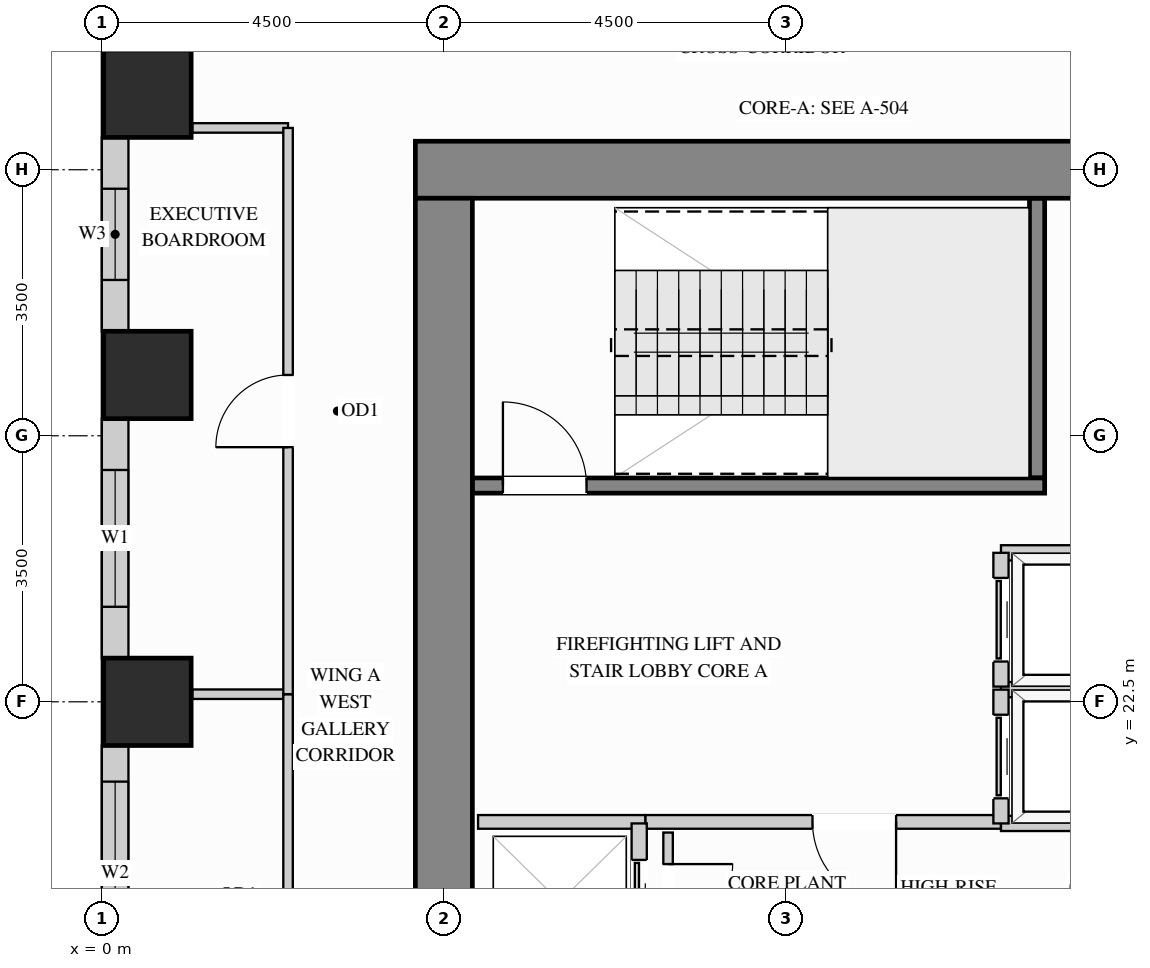
"""IFC4 building model, lengths in metres.
Left out: names, types, materials, properties, quantities, classifications, styles, units other than length and angle.
Written with IfcOpenShell. Run it as: python <this file> out.ifc"""

import sys

from ifc_helpers import new_model, si_unit, direction, frame, frame_2d, origin, origin_2d, place, context, subcontext, project, spatial, rectangle, extrude, source, transform, mapped, element, fill, save


model = new_model("IFC4")
c1 = context("Model", 3, precision=1e-05, world=origin(), true_north=direction((0.0, 1.0)))
c2 = subcontext(c1, "Body", "Model", "MODEL_VIEW")
j1 = project(units=[si_unit("LENGTHUNIT", "METRE"), si_unit("PLANEANGLEUNIT", "RADIAN")], contexts=[c1])
p1 = place(None, origin())
s1 = spatial("IfcSite", under=j1, at=p1, CompositionType="ELEMENT")
p2 = place(p1, origin())
s2 = spatial("IfcBuilding", under=s1, at=p2, CompositionType="ELEMENT")
p3 = place(p2, frame((0.0, 0.0, 131.4)))
s3 = spatial("IfcBuildingStorey", under=s2, at=p3, CompositionType="ELEMENT", Elevation=131.4)
m1 = source(origin(), c2, "Body", "SweptSolid", [
    extrude(rectangle(XDim=1.15, YDim=1.15, at=origin_2d()), origin(), (0.0, 0.0, 1.0), 3.38),
])
for number, where, z_axis, x_axis in (
    (1, (0.6, 22.5, 0.0), (0.0, 0.0, 1.0), (1.0, 0.0, 0.0)),
    (2, (0.6, 26.8, 0.0), (0.0, 0.0, 1.0), (1.0, 0.0, 0.0)),
    (3, (0.6, 30.5, 0.0), (0.0, 0.0, 1.0), (1.0, 0.0, 0.0)),
):
    element("IfcColumn", number, at=place(p3, frame(where, z_axis=z_axis, x_axis=x_axis)), inside=s3, PredefinedType="COLUMN", context=c2, shape_type="MappedRepresentation", body=[
        mapped(m1, transform((0.0, 0.0, 0.0), x_axis=(1.0, 0.0, 0.0), y_axis=(0.0, 1.0, 0.0), z_axis=(0.0, 0.0, 1.0))),
    ])
m2 = source(origin(), c2, "Body", "SweptSolid", [
    extrude(rectangle(XDim=10.75, YDim=0.75, at=frame_2d((5.375, 0.0))), origin(), (0.0, 0.0, 1.0), 3.38),
])
p4 = place(p3, frame((4.125, 29.5, 0.0), z_axis=(0.0, 0.0, 1.0), x_axis=(1.0, 0.0, 0.0)))
e4 = element("IfcWall", 4, at=p4, inside=s3, PredefinedType="SHEAR", context=c2, shape_type="MappedRepresentation", body=[
    mapped(m2, transform((0.0, 0.0, 0.0), x_axis=(1.0, 0.0, 0.0), y_axis=(0.0, 1.0, 0.0), z_axis=(0.0, 0.0, 1.0))),
])
m3 = source(origin(), c2, "Body", "SweptSolid", [
    extrude(rectangle(XDim=20.25, YDim=0.75, at=frame_2d((10.125, 0.0))), origin(), (0.0, 0.0, 1.0), 3.38),
])
p5 = place(p3, frame((4.5, 8.875, 0.0), z_axis=(0.0, 0.0, 1.0), x_axis=(0.0, 1.0, 0.0)))
e5 = element("IfcWall", 5, at=p5, inside=s3, PredefinedType="SHEAR", context=c2, shape_type="MappedRepresentation", body=[
    mapped(m3, transform((0.0, 0.0, 0.0), x_axis=(1.0, 0.0, 0.0), y_axis=(0.0, 1.0, 0.0), z_axis=(0.0, 0.0, 1.0))),
])
p6 = place(p3, frame((0.175, 29.927, 0.0), z_axis=(0.0, 0.0, 1.0), x_axis=(0.0, -1.0, 0.0)))
e6 = element("IfcWall", 6, at=p6, inside=s3, PredefinedType="SOLIDWALL", context=c2, shape_type="SweptSolid", body=[
    extrude(rectangle(XDim=2.554, YDim=0.35, at=frame_2d((1.277, 0.0))), origin(), (0.0, 0.0, 1.0), 3.365),
])
p7 = place(p6, frame((0.677, 0.0, 0.78)))
e7 = element("IfcOpeningElement", 7, at=p7, cuts=e6, PredefinedType="OPENING", context=c2, shape_type="SweptSolid", body=[
    extrude(rectangle(XDim=1.2, YDim=2.1, at=frame_2d((0.6, 1.05))), frame((0.0, 0.185, 0.0), z_axis=(0.0, -1.0, 0.0), x_axis=(1.0, 0.0, 0.0)), (0.0, 0.0, 1.0), 0.37),
])
p8 = place(p3, frame((0.175, 26.227, 0.0), z_axis=(0.0, 0.0, 1.0), x_axis=(0.0, -1.0, 0.0)))
e8 = element("IfcWall", 8, at=p8, inside=s3, PredefinedType="SOLIDWALL", context=c2, shape_type="SweptSolid", body=[
    extrude(rectangle(XDim=3.154, YDim=0.35, at=frame_2d((1.577, 0.0))), origin(), (0.0, 0.0, 1.0), 3.365),
])
p9 = place(p8, frame((0.677, 0.0, 0.78)))
e9 = element("IfcOpeningElement", 9, at=p9, cuts=e8, PredefinedType="OPENING", context=c2, shape_type="SweptSolid", body=[
    extrude(rectangle(XDim=1.8, YDim=2.1, at=frame_2d((0.9, 1.05))), frame((0.0, 0.185, 0.0), z_axis=(0.0, -1.0, 0.0), x_axis=(1.0, 0.0, 0.0)), (0.0, 0.0, 1.0), 0.37),
])
p10 = place(p3, frame((0.175, 21.927, 0.0), z_axis=(0.0, 0.0, 1.0), x_axis=(0.0, -1.0, 0.0)))
e10 = element("IfcWall", 10, at=p10, inside=s3, PredefinedType="SOLIDWALL", context=c2, shape_type="SweptSolid", body=[
    extrude(rectangle(XDim=3.354, YDim=0.35, at=frame_2d((1.677, 0.0))), origin(), (0.0, 0.0, 1.0), 3.365),
])
p11 = place(p10, frame((0.477, 0.0, 0.78)))
e11 = element("IfcOpeningElement", 11, at=p11, cuts=e10, PredefinedType="OPENING", context=c2, shape_type="SweptSolid", body=[
    extrude(rectangle(XDim=2.4, YDim=2.1, at=frame_2d((1.2, 1.05))), frame((0.0, 0.185, 0.0), z_axis=(0.0, -1.0, 0.0), x_axis=(1.0, 0.0, 0.0)), (0.0, 0.0, 1.0), 0.37),
])
p12 = place(p3, frame((7.15, 20.92, 0.0), z_axis=(0.0, 0.0, 1.0), x_axis=(1.0, 0.0, 0.0)))
e12 = element("IfcWall", 12, at=p12, inside=s3, PredefinedType="PARTITIONING", context=c2, shape_type="SweptSolid", body=[
    extrude(rectangle(XDim=4.68, YDim=0.18, at=frame_2d((2.34, 0.0))), origin(), (0.0, 0.0, 1.0), 3.365),
])
p13 = place(p12, frame((2.2, 0.0, 0.0)))
e13 = element("IfcOpeningElement", 13, at=p13, cuts=e12, PredefinedType="OPENING", context=c2, shape_type="SweptSolid", body=[
    extrude(rectangle(XDim=1.1, YDim=2.15, at=frame_2d((0.55, 1.075))), frame((0.0, 0.1, 0.0), z_axis=(0.0, -1.0, 0.0), x_axis=(1.0, 0.0, 0.0)), (0.0, 0.0, 1.0), 0.2),
])
m4 = source(origin(), c2, "Body", "SweptSolid", [
    extrude(rectangle(XDim=2.2, YDim=0.18, at=frame_2d((1.1, 0.0))), origin(), (0.0, 0.0, 1.0), 3.365),
])
p14 = place(p3, frame((4.95, 20.92, 0.0), z_axis=(0.0, 0.0, 1.0), x_axis=(1.0, 0.0, 0.0)))
e14 = element("IfcWall", 14, at=p14, inside=s3, PredefinedType="PARTITIONING", context=c2, shape_type="MappedRepresentation", body=[
    mapped(m4, transform((0.0, 0.0, 0.0), x_axis=(1.0, 0.0, 0.0), y_axis=(0.0, 1.0, 0.0), z_axis=(0.0, 0.0, 1.0))),
])
p15 = place(p3, frame((7.45, 19.2, 0.0), z_axis=(0.0, 0.0, 1.0), x_axis=(0.0, 1.0, 0.0)))
e15 = element("IfcWall", 15, at=p15, inside=s3, PredefinedType="PARTITIONING", context=c2, shape_type="SweptSolid", body=[
    extrude(rectangle(XDim=1.58, YDim=0.125, at=frame_2d((0.79, 0.0))), origin(), (0.0, 0.0, 1.0), 3.365),
])
p16 = place(p15, frame((0.315, 0.0, 0.0)))
e16 = element("IfcOpeningElement", 16, at=p16, cuts=e15, PredefinedType="OPENING", context=c2, shape_type="SweptSolid", body=[
    extrude(rectangle(XDim=0.85, YDim=2.1, at=frame_2d((0.425, 1.05))), frame((0.0, 0.073, 0.0), z_axis=(0.0, -1.0, 0.0), x_axis=(1.0, 0.0, 0.0)), (0.0, 0.0, 1.0), 0.145),
])
m5 = source(origin(), c2, "Body", "SweptSolid", [
    extrude(rectangle(XDim=1.26, YDim=0.125, at=frame_2d((0.63, 0.0))), origin(), (0.0, 0.0, 1.0), 3.365),
])
for number, where, z_axis, x_axis in (
    (17, (1.19, 30.05, 0.0), (0.0, 0.0, 1.0), (1.0, 0.0, 0.0)),
    (18, (1.19, 22.6, 0.0), (0.0, 0.0, 1.0), (1.0, 0.0, 0.0)),
):
    element("IfcWall", number, at=place(p3, frame(where, z_axis=z_axis, x_axis=x_axis)), inside=s3, PredefinedType="PARTITIONING", context=c2, shape_type="MappedRepresentation", body=[
        mapped(m5, transform((0.0, 0.0, 0.0), x_axis=(1.0, 0.0, 0.0), y_axis=(0.0, 1.0, 0.0), z_axis=(0.0, 0.0, 1.0))),
    ])
p17 = place(p3, frame((2.45, 15.1, 0.0), z_axis=(0.0, 0.0, 1.0), x_axis=(0.0, 1.0, 0.0)))
e19 = element("IfcWall", 19, at=p17, inside=s3, PredefinedType="PARTITIONING", context=c2, shape_type="SweptSolid", body=[
    extrude(rectangle(XDim=7.5, YDim=0.125, at=frame_2d((3.75, 0.0))), origin(), (0.0, 0.0, 1.0), 3.365),
])
p18 = place(p17, frame((3.275, 0.0, 0.0)))
e20 = element("IfcOpeningElement", 20, at=p18, cuts=e19, PredefinedType="OPENING", context=c2, shape_type="SweptSolid", body=[
    extrude(rectangle(XDim=0.95, YDim=2.15, at=frame_2d((0.475, 1.075))), frame((0.0, 0.073, 0.0), z_axis=(0.0, -1.0, 0.0), x_axis=(1.0, 0.0, 0.0)), (0.0, 0.0, 1.0), 0.145),
])
p19 = place(p3, frame((2.45, 22.6, 0.0), z_axis=(0.0, 0.0, 1.0), x_axis=(0.0, 1.0, 0.0)))
e21 = element("IfcWall", 21, at=p19, inside=s3, PredefinedType="PARTITIONING", context=c2, shape_type="SweptSolid", body=[
    extrude(rectangle(XDim=7.45, YDim=0.125, at=frame_2d((3.725, 0.0))), origin(), (0.0, 0.0, 1.0), 3.365),
])
p20 = place(p19, frame((3.25, 0.0, 0.0)))
e22 = element("IfcOpeningElement", 22, at=p20, cuts=e21, PredefinedType="OPENING", context=c2, shape_type="SweptSolid", body=[
    extrude(rectangle(XDim=0.95, YDim=2.15, at=frame_2d((0.475, 1.075))), frame((0.0, 0.073, 0.0), z_axis=(0.0, -1.0, 0.0), x_axis=(1.0, 0.0, 0.0)), (0.0, 0.0, 1.0), 0.145),
])
m6 = source(origin(), c2, "Body", "SweptSolid", [
    extrude(rectangle(XDim=2.265, YDim=0.2, at=frame_2d((1.132, 0.0))), origin(), (0.0, 0.0, 1.0), 3.365),
])
for number, where, z_axis, x_axis in (
    (23, (11.83, 22.66, 0.0), (0.0, 0.0, 1.0), (1.0, 0.0, 0.0)),
    (24, (11.83, 20.9, 0.0), (0.0, 0.0, 1.0), (1.0, 0.0, 0.0)),
):
    element("IfcWall", number, at=place(p3, frame(where, z_axis=z_axis, x_axis=x_axis)), inside=s3, PredefinedType="PARTITIONING", context=c2, shape_type="MappedRepresentation", body=[
        mapped(m6, transform((0.0, 0.0, 0.0), x_axis=(1.0, 0.0, 0.0), y_axis=(0.0, 1.0, 0.0), z_axis=(0.0, 0.0, 1.0))),
    ])
p21 = place(p3, frame((11.83, 20.9, 0.0), z_axis=(0.0, 0.0, 1.0), x_axis=(0.0, 1.0, 0.0)))
e25 = element("IfcWall", 25, at=p21, inside=s3, PredefinedType="PARTITIONING", context=c2, shape_type="SweptSolid", body=[
    extrude(rectangle(XDim=1.76, YDim=0.2, at=frame_2d((0.88, 0.0))), origin(), (0.0, 0.0, 1.0), 3.365),
])
p22 = place(p21, frame((0.33, 0.0, 0.0)))
e26 = element("IfcOpeningElement", 26, at=p22, cuts=e25, PredefinedType="OPENING", context=c2, shape_type="SweptSolid", body=[
    extrude(rectangle(XDim=1.1, YDim=2.2, at=frame_2d((0.55, 1.1))), frame((0.0, 0.11, 0.0), z_axis=(0.0, -1.0, 0.0), x_axis=(1.0, 0.0, 0.0)), (0.0, 0.0, 1.0), 0.22),
])
p23 = place(p3, frame((11.83, 24.46, 0.0), z_axis=(0.0, 0.0, 1.0), x_axis=(1.0, 0.0, 0.0)))
e27 = element("IfcWall", 27, at=p23, inside=s3, PredefinedType="PARTITIONING", context=c2, shape_type="MappedRepresentation", body=[
    mapped(m6, transform((0.0, 0.0, 0.0), x_axis=(1.0, 0.0, 0.0), y_axis=(0.0, 1.0, 0.0), z_axis=(0.0, 0.0, 1.0))),
])
p24 = place(p3, frame((11.83, 22.7, 0.0), z_axis=(0.0, 0.0, 1.0), x_axis=(0.0, 1.0, 0.0)))
e28 = element("IfcWall", 28, at=p24, inside=s3, PredefinedType="PARTITIONING", context=c2, shape_type="SweptSolid", body=[
    extrude(rectangle(XDim=1.76, YDim=0.2, at=frame_2d((0.88, 0.0))), origin(), (0.0, 0.0, 1.0), 3.365),
])
p25 = place(p24, frame((0.33, 0.0, 0.0)))
e29 = element("IfcOpeningElement", 29, at=p25, cuts=e28, PredefinedType="OPENING", context=c2, shape_type="SweptSolid", body=[
    extrude(rectangle(XDim=1.1, YDim=2.2, at=frame_2d((0.55, 1.1))), frame((0.0, 0.11, 0.0), z_axis=(0.0, -1.0, 0.0), x_axis=(1.0, 0.0, 0.0)), (0.0, 0.0, 1.0), 0.22),
])
p26 = place(p3, frame((7.07, 18.84, 0.0), z_axis=(0.0, 0.0, 1.0), x_axis=(0.0, 1.0, 0.0)))
e30 = element("IfcWall", 30, at=p26, inside=s3, PredefinedType="PARTITIONING", context=c2, shape_type="SweptSolid", body=[
    extrude(rectangle(XDim=2.06, YDim=0.2, at=frame_2d((1.03, 0.0))), origin(), (0.0, 0.0, 1.0), 3.365),
])
p27 = place(p26, frame((0.48, 0.0, 0.0)))
e31 = element("IfcOpeningElement", 31, at=p27, cuts=e30, PredefinedType="OPENING", context=c2, shape_type="SweptSolid", body=[
    extrude(rectangle(XDim=1.1, YDim=2.2, at=frame_2d((0.55, 1.1))), frame((0.0, 0.11, 0.0), z_axis=(0.0, -1.0, 0.0), x_axis=(1.0, 0.0, 0.0)), (0.0, 0.0, 1.0), 0.22),
])
m7 = source(origin(), c2, "Body", "SweptSolid", [
    extrude(rectangle(XDim=3.678, YDim=0.2, at=frame_2d((1.839, 0.0))), origin(), (0.0, 0.0, 1.0), 3.38),
])
p28 = place(p3, frame((12.305, 25.445, 0.0), z_axis=(0.0, 0.0, 1.0), x_axis=(0.0, 1.0, 0.0)))
e32 = element("IfcWall", 32, at=p28, inside=s3, PredefinedType="SHEAR", context=c2, shape_type="MappedRepresentation", body=[
    mapped(m7, transform((0.0, 0.0, 0.0), x_axis=(1.0, 0.0, 0.0), y_axis=(0.0, 1.0, 0.0), z_axis=(0.0, 0.0, 1.0))),
])
p29 = place(p3, frame((4.877, 25.345, 0.0), z_axis=(0.0, 0.0, 1.0), x_axis=(1.0, 0.0, 0.0)))
e33 = element("IfcWall", 33, at=p29, inside=s3, PredefinedType="SHEAR", context=c2, shape_type="SweptSolid", body=[
    extrude(rectangle(XDim=7.528, YDim=0.2, at=frame_2d((3.764, 0.0))), origin(), (0.0, 0.0, 1.0), 3.38),
])
p30 = place(p29, frame((0.4, 0.0, 0.0)))
e34 = element("IfcOpeningElement", 34, at=p30, cuts=e33, PredefinedType="OPENING", context=c2, shape_type="SweptSolid", body=[
    extrude(rectangle(XDim=1.1, YDim=2.15, at=frame_2d((0.55, 1.075))), frame((0.0, 0.11, 0.0), z_axis=(0.0, -1.0, 0.0), x_axis=(1.0, 0.0, 0.0)), (0.0, 0.0, 1.0), 0.22),
])
m8 = source(origin(), c2, "Body", "SweptSolid", [
    extrude(rectangle(XDim=1.1, YDim=2.15, at=frame_2d((0.55, 1.075))), frame((0.0, 0.025, 0.0), z_axis=(0.0, -1.0, 0.0), x_axis=(1.0, 0.0, 0.0)), (0.0, 0.0, 1.0), 0.05),
])
p31 = place(p13, origin())
e35 = element("IfcDoor", 35, at=p31, inside=s3, OperationType="SINGLE_SWING_RIGHT", PredefinedType="DOOR", context=c2, shape_type="MappedRepresentation", body=[
    mapped(m8, transform((0.0, 0.0, 0.0), x_axis=(1.0, 0.0, 0.0), y_axis=(0.0, 1.0, 0.0), z_axis=(0.0, 0.0, 1.0))),
])
fill(e13, e35)
m9 = source(origin(), c2, "Body", "SweptSolid", [
    extrude(rectangle(XDim=1.1, YDim=2.2, at=frame_2d((0.55, 1.1))), frame((0.0, 0.025, 0.0), z_axis=(0.0, -1.0, 0.0), x_axis=(1.0, 0.0, 0.0)), (0.0, 0.0, 1.0), 0.05),
])
p32 = place(p22, origin())
e36 = element("IfcDoor", 36, at=p32, inside=s3, OperationType="SLIDING_TO_LEFT", PredefinedType="DOOR", context=c2, shape_type="MappedRepresentation", body=[
    mapped(m9, transform((0.0, 0.0, 0.0), x_axis=(1.0, 0.0, 0.0), y_axis=(0.0, 1.0, 0.0), z_axis=(0.0, 0.0, 1.0))),
])
fill(e26, e36)
p33 = place(p25, origin())
e37 = element("IfcDoor", 37, at=p33, inside=s3, OperationType="SLIDING_TO_LEFT", PredefinedType="DOOR", context=c2, shape_type="MappedRepresentation", body=[
    mapped(m9, transform((0.0, 0.0, 0.0), x_axis=(1.0, 0.0, 0.0), y_axis=(0.0, 1.0, 0.0), z_axis=(0.0, 0.0, 1.0))),
])
fill(e29, e37)
p34 = place(p27, origin())
e38 = element("IfcDoor", 38, at=p34, inside=s3, OperationType="SLIDING_TO_LEFT", PredefinedType="DOOR", context=c2, shape_type="MappedRepresentation", body=[
    mapped(m9, transform((0.0, 0.0, 0.0), x_axis=(1.0, 0.0, 0.0), y_axis=(0.0, 1.0, 0.0), z_axis=(0.0, 0.0, 1.0))),
])
fill(e31, e38)
m10 = source(origin(), c2, "Body", "SweptSolid", [
    extrude(rectangle(XDim=0.95, YDim=2.15, at=frame_2d((0.475, 1.075))), frame((0.0, 0.025, 0.0), z_axis=(0.0, -1.0, 0.0), x_axis=(1.0, 0.0, 0.0)), (0.0, 0.0, 1.0), 0.05),
])
p35 = place(p20, origin())
e39 = element("IfcDoor", 39, at=p35, inside=s3, OperationType="SINGLE_SWING_LEFT", PredefinedType="DOOR", context=c2, shape_type="MappedRepresentation", body=[
    mapped(m10, transform((0.0, 0.0, 0.0), x_axis=(1.0, 0.0, 0.0), y_axis=(0.0, 1.0, 0.0), z_axis=(0.0, 0.0, 1.0))),
])
fill(e22, e39)
m11 = source(origin(), c2, "Body", "SweptSolid", [
    extrude(rectangle(XDim=0.85, YDim=2.1, at=frame_2d((0.425, 1.05))), frame((0.0, 0.025, 0.0), z_axis=(0.0, -1.0, 0.0), x_axis=(1.0, 0.0, 0.0)), (0.0, 0.0, 1.0), 0.05),
])
p36 = place(p16, origin())
e40 = element("IfcDoor", 40, at=p36, inside=s3, OperationType="SINGLE_SWING_RIGHT", PredefinedType="DOOR", context=c2, shape_type="MappedRepresentation", body=[
    mapped(m11, transform((0.0, 0.0, 0.0), x_axis=(1.0, 0.0, 0.0), y_axis=(0.0, 1.0, 0.0), z_axis=(0.0, 0.0, 1.0))),
])
fill(e16, e40)
m12 = source(origin(), c2, "Body", "SweptSolid", [
    extrude(rectangle(XDim=1.1, YDim=2.15, at=frame_2d((0.55, 1.075))), frame((0.0, 0.025, 0.0), z_axis=(0.0, -1.0, 0.0), x_axis=(1.0, 0.0, 0.0)), (0.0, 0.0, 1.0), 0.05),
])
p37 = place(p30, origin())
e41 = element("IfcDoor", 41, at=p37, inside=s3, OperationType="SINGLE_SWING_LEFT", PredefinedType="DOOR", context=c2, shape_type="MappedRepresentation", body=[
    mapped(m12, transform((0.0, 0.0, 0.0), x_axis=(1.0, 0.0, 0.0), y_axis=(0.0, 1.0, 0.0), z_axis=(0.0, 0.0, 1.0))),
])
fill(e34, e41)
m13 = source(origin(), c2, "Body", "SweptSolid", [
    extrude(rectangle(XDim=1.8, YDim=2.1, at=frame_2d((0.9, 1.05))), frame((0.0, 0.03, 0.0), z_axis=(0.0, -1.0, 0.0), x_axis=(1.0, 0.0, 0.0)), (0.0, 0.0, 1.0), 0.06),
])
p38 = place(p9, origin())
e42 = element("IfcWindow", 42, at=p38, inside=s3, PartitioningType="SINGLE_PANEL", PredefinedType="WINDOW", context=c2, shape_type="MappedRepresentation", body=[
    mapped(m13, transform((0.0, 0.0, 0.0), x_axis=(1.0, 0.0, 0.0), y_axis=(0.0, 1.0, 0.0), z_axis=(0.0, 0.0, 1.0))),
])
fill(e9, e42)
m14 = source(origin(), c2, "Body", "SweptSolid", [
    extrude(rectangle(XDim=2.4, YDim=2.1, at=frame_2d((1.2, 1.05))), frame((0.0, 0.03, 0.0), z_axis=(0.0, -1.0, 0.0), x_axis=(1.0, 0.0, 0.0)), (0.0, 0.0, 1.0), 0.06),
])
p39 = place(p11, origin())
e43 = element("IfcWindow", 43, at=p39, inside=s3, PartitioningType="SINGLE_PANEL", PredefinedType="WINDOW", context=c2, shape_type="MappedRepresentation", body=[
    mapped(m14, transform((0.0, 0.0, 0.0), x_axis=(1.0, 0.0, 0.0), y_axis=(0.0, 1.0, 0.0), z_axis=(0.0, 0.0, 1.0))),
])
fill(e11, e43)
m15 = source(origin(), c2, "Body", "SweptSolid", [
    extrude(rectangle(XDim=1.2, YDim=2.1, at=frame_2d((0.6, 1.05))), frame((0.0, 0.03, 0.0), z_axis=(0.0, -1.0, 0.0), x_axis=(1.0, 0.0, 0.0)), (0.0, 0.0, 1.0), 0.06),
])
p40 = place(p7, origin())
e44 = element("IfcWindow", 44, at=p40, inside=s3, PartitioningType="SINGLE_PANEL", PredefinedType="WINDOW", context=c2, shape_type="MappedRepresentation", body=[
    mapped(m15, transform((0.0, 0.0, 0.0), x_axis=(1.0, 0.0, 0.0), y_axis=(0.0, 1.0, 0.0), z_axis=(0.0, 0.0, 1.0))),
])
fill(e7, e44)
save(model, sys.argv[1])
